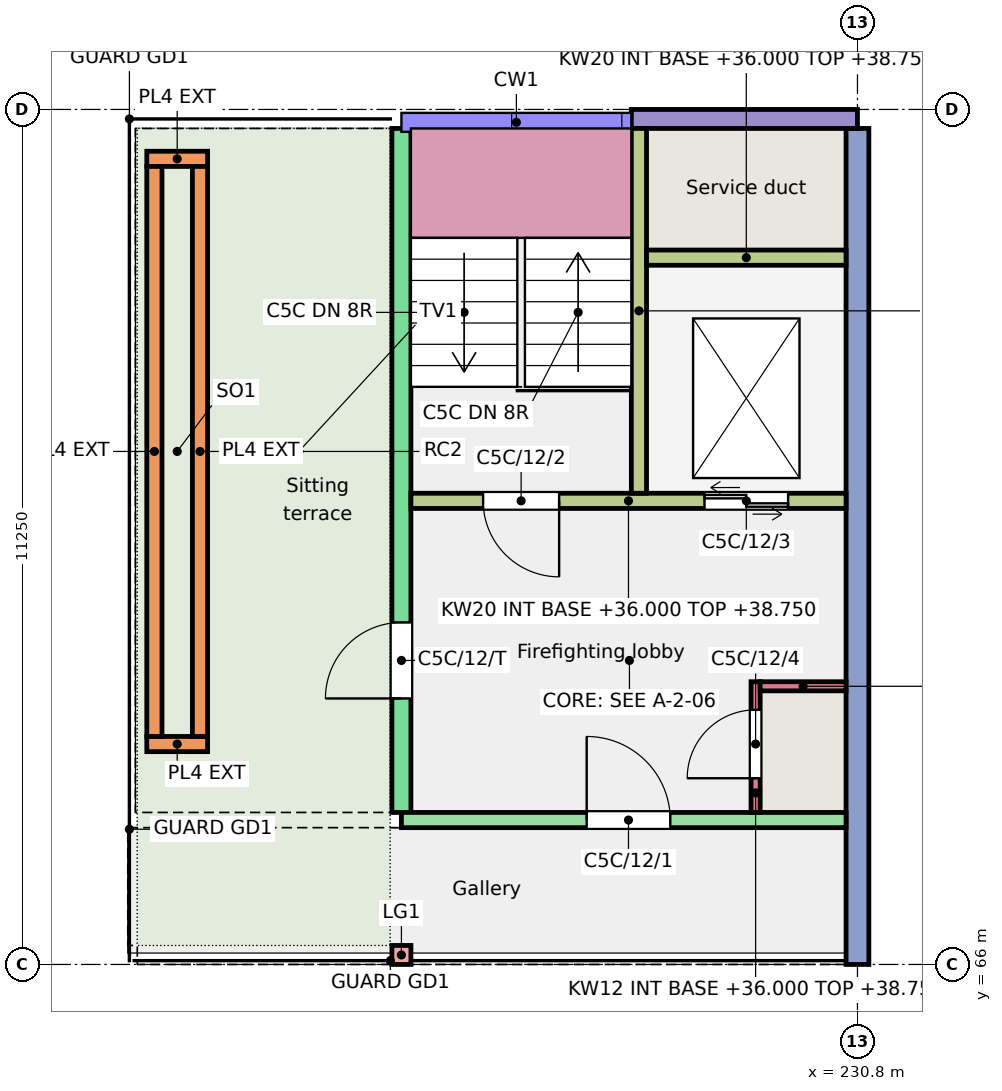
"""IFC4 building model, lengths in metres.
Left out: names, types, materials, properties, quantities, classifications, styles, units other than length and angle.
Written with IfcOpenShell. Run it as: python <this file> out.ifc"""

import sys

from ifc_helpers import new_model, si_unit, direction, frame, frame_2d, origin, origin_2d, place, context, subcontext, project, spatial, rectangle, extrude, element, fill, save


model = new_model("IFC4")
c1 = context("Model", 3, precision=1e-05, world=origin(), true_north=direction((0.0, 1.0)))
c2 = subcontext(c1, "Body", "Model", "MODEL_VIEW")
j1 = project(units=[si_unit("LENGTHUNIT", "METRE"), si_unit("PLANEANGLEUNIT", "RADIAN")], contexts=[c1])
p1 = place(None, origin())
s1 = spatial("IfcSite", under=j1, at=p1, CompositionType="ELEMENT")
p2 = place(p1, origin())
s2 = spatial("IfcBuilding", under=s1, at=p2, CompositionType="ELEMENT")
p3 = place(p2, frame((0.0, 0.0, 36.0)))
s3 = spatial("IfcBuildingStorey", under=s2, at=p3, CompositionType="ELEMENT", Elevation=36.0)
p4 = place(p3, frame((224.8, 68.0, 0.0), z_axis=(0.0, 0.0, 1.0), x_axis=(0.0, 1.0, 0.0)))
e1 = element("IfcWall", 1, at=p4, inside=s3, PredefinedType="SHEAR", context=c2, shape_type="SweptSolid", body=[
    extrude(rectangle(XDim=9.0, YDim=0.25, at=frame_2d((4.5, 0.0))), origin(), (0.0, 0.0, 1.0), 3.0),
])
p5 = place(p4, frame((1.5, 0.0, 0.0)))
e2 = element("IfcOpeningElement", 2, at=p5, cuts=e1, PredefinedType="OPENING", context=c2, shape_type="SweptSolid", body=[
    extrude(rectangle(XDim=1.0, YDim=2.1, at=frame_2d((0.5, 1.05))), frame((0.0, 0.135, 0.0), z_axis=(0.0, -1.0, 0.0), x_axis=(1.0, 0.0, 0.0)), (0.0, 0.0, 1.0), 0.27),
])
p6 = place(p3, frame((230.8, 66.0, 0.0), z_axis=(0.0, 0.0, 1.0), x_axis=(0.0, 1.0, 0.0)))
e3 = element("IfcWall", 3, at=p6, inside=s3, PredefinedType="SHEAR", context=c2, shape_type="SweptSolid", body=[
    extrude(rectangle(XDim=11.0, YDim=0.3, at=frame_2d((5.5, 0.0))), origin(), (0.0, 0.0, 1.0), 3.0),
])
p7 = place(p3, frame((227.825, 77.125, 0.0), z_axis=(0.0, 0.0, 1.0), x_axis=(1.0, 0.0, 0.0)))
e4 = element("IfcWall", 4, at=p7, inside=s3, PredefinedType="SOLIDWALL", context=c2, shape_type="SweptSolid", body=[
    extrude(rectangle(XDim=2.975, YDim=0.25, at=frame_2d((1.488, 0.0))), origin(), (0.0, 0.0, 1.0), 3.0),
])
p8 = place(p3, frame((224.8, 67.9, 0.0), z_axis=(0.0, 0.0, 1.0), x_axis=(1.0, 0.0, 0.0)))
e5 = element("IfcWall", 5, at=p8, inside=s3, PredefinedType="SHEAR", context=c2, shape_type="SweptSolid", body=[
    extrude(rectangle(XDim=5.85, YDim=0.2, at=frame_2d((2.925, 0.0))), origin(), (0.0, 0.0, 1.0), 2.75),
])
p9 = place(p8, frame((2.438, 0.0, 0.0)))
e6 = element("IfcOpeningElement", 6, at=p9, cuts=e5, PredefinedType="OPENING", context=c2, shape_type="SweptSolid", body=[
    extrude(rectangle(XDim=1.1, YDim=2.1, at=frame_2d((0.55, 1.05))), frame((0.0, 0.11, 0.0), z_axis=(0.0, -1.0, 0.0), x_axis=(1.0, 0.0, 0.0)), (0.0, 0.0, 1.0), 0.22),
])
p10 = place(p3, frame((224.925, 72.1, 0.0), z_axis=(0.0, 0.0, 1.0), x_axis=(1.0, 0.0, 0.0)))
e7 = element("IfcWall", 7, at=p10, inside=s3, PredefinedType="SHEAR", context=c2, shape_type="SweptSolid", body=[
    extrude(rectangle(XDim=5.725, YDim=0.2, at=frame_2d((2.862, 0.0))), origin(), (0.0, 0.0, 1.0), 2.75),
])
p11 = place(p10, frame((0.95, 0.0, 0.0)))
e8 = element("IfcOpeningElement", 8, at=p11, cuts=e7, PredefinedType="OPENING", context=c2, shape_type="SweptSolid", body=[
    extrude(rectangle(XDim=1.0, YDim=2.1, at=frame_2d((0.5, 1.05))), frame((0.0, 0.11, 0.0), z_axis=(0.0, -1.0, 0.0), x_axis=(1.0, 0.0, 0.0)), (0.0, 0.0, 1.0), 0.22),
])
p12 = place(p10, frame((3.863, 0.0, 0.0)))
e9 = element("IfcOpeningElement", 9, at=p12, cuts=e7, PredefinedType="OPENING", context=c2, shape_type="SweptSolid", body=[
    extrude(rectangle(XDim=1.1, YDim=2.1, at=frame_2d((0.55, 1.05))), frame((0.0, 0.11, 0.0), z_axis=(0.0, -1.0, 0.0), x_axis=(1.0, 0.0, 0.0)), (0.0, 0.0, 1.0), 0.22),
])
p13 = place(p3, frame((227.925, 72.2, 0.0), z_axis=(0.0, 0.0, 1.0), x_axis=(0.0, 1.0, 0.0)))
e10 = element("IfcWall", 10, at=p13, inside=s3, PredefinedType="SHEAR", context=c2, shape_type="SweptSolid", body=[
    extrude(rectangle(XDim=4.8, YDim=0.2, at=frame_2d((2.4, 0.0))), origin(), (0.0, 0.0, 1.0), 2.75),
])
p14 = place(p3, frame((228.025, 75.3, 0.0), z_axis=(0.0, 0.0, 1.0), x_axis=(1.0, 0.0, 0.0)))
e11 = element("IfcWall", 11, at=p14, inside=s3, PredefinedType="SHEAR", context=c2, shape_type="SweptSolid", body=[
    extrude(rectangle(XDim=2.625, YDim=0.2, at=frame_2d((1.312, 0.0))), origin(), (0.0, 0.0, 1.0), 2.75),
])
p15 = place(p3, frame((229.46, 68.0, 0.0), z_axis=(0.0, 0.0, 1.0), x_axis=(0.0, 1.0, 0.0)))
e12 = element("IfcWall", 12, at=p15, inside=s3, PredefinedType="SHEAR", context=c2, shape_type="SweptSolid", body=[
    extrude(rectangle(XDim=1.72, YDim=0.12, at=frame_2d((0.86, 0.0))), origin(), (0.0, 0.0, 1.0), 2.75),
])
p16 = place(p15, frame((0.45, 0.0, 0.0)))
e13 = element("IfcOpeningElement", 13, at=p16, cuts=e12, PredefinedType="OPENING", context=c2, shape_type="SweptSolid", body=[
    extrude(rectangle(XDim=0.9, YDim=2.1, at=frame_2d((0.45, 1.05))), frame((0.0, 0.07, 0.0), z_axis=(0.0, -1.0, 0.0), x_axis=(1.0, 0.0, 0.0)), (0.0, 0.0, 1.0), 0.14),
])
p17 = place(p3, frame((229.52, 69.66, 0.0), z_axis=(0.0, 0.0, 1.0), x_axis=(1.0, 0.0, 0.0)))
e14 = element("IfcWall", 14, at=p17, inside=s3, PredefinedType="SHEAR", context=c2, shape_type="SweptSolid", body=[
    extrude(rectangle(XDim=1.13, YDim=0.12, at=frame_2d((0.565, 0.0))), origin(), (0.0, 0.0, 1.0), 2.75),
])
p18 = place(p3, frame((224.8, 66.125, 0.0), z_axis=(0.0, 0.0, 1.0), x_axis=(1.0, 0.0, 0.0)))
e15 = element("IfcColumn", 15, at=p18, inside=s3, PredefinedType="COLUMN", context=c2, shape_type="SweptSolid", body=[
    extrude(rectangle(XDim=0.25, YDim=0.25, at=origin_2d()), origin(), (0.0, 0.0, 1.0), 3.0),
])
for number, where, z_axis, x_axis in (
    (16, (221.45, 68.9, 0.01), (0.0, 0.0, 1.0), (1.0, 0.0, 0.0)),
    (17, (221.45, 76.6, 0.01), (0.0, 0.0, 1.0), (1.0, 0.0, 0.0)),
):
    element("IfcWall", number, at=place(p3, frame(where, z_axis=z_axis, x_axis=x_axis)), inside=s3, PredefinedType="SOLIDWALL", context=c2, shape_type="SweptSolid", body=[
        extrude(rectangle(XDim=0.8, YDim=0.2, at=frame_2d((0.4, 0.0))), origin(), (0.0, 0.0, 1.0), 0.45),
    ])
for number, where, z_axis, x_axis in (
    (18, (221.55, 69.0, 0.01), (0.0, 0.0, 1.0), (0.0, 1.0, 0.0)),
    (19, (222.15, 69.0, 0.01), (0.0, 0.0, 1.0), (0.0, 1.0, 0.0)),
):
    element("IfcWall", number, at=place(p3, frame(where, z_axis=z_axis, x_axis=x_axis)), inside=s3, PredefinedType="SOLIDWALL", context=c2, shape_type="SweptSolid", body=[
        extrude(rectangle(XDim=7.5, YDim=0.2, at=frame_2d((3.75, 0.0))), origin(), (0.0, 0.0, 1.0), 0.45),
    ])
p19 = place(p9, origin())
e20 = element("IfcDoor", 20, at=p19, inside=s3, OperationType="SINGLE_SWING_LEFT", PredefinedType="DOOR", context=c2, shape_type="SweptSolid", body=[
    extrude(rectangle(XDim=1.1, YDim=2.1, at=frame_2d((0.55, 1.05))), frame((0.0, 0.025, 0.0), z_axis=(0.0, -1.0, 0.0), x_axis=(1.0, 0.0, 0.0)), (0.0, 0.0, 1.0), 0.05),
])
fill(e6, e20)
p20 = place(p11, origin())
e21 = element("IfcDoor", 21, at=p20, inside=s3, OperationType="SINGLE_SWING_RIGHT", PredefinedType="DOOR", context=c2, shape_type="SweptSolid", body=[
    extrude(rectangle(XDim=1.0, YDim=2.1, at=frame_2d((0.5, 1.05))), frame((0.0, 0.025, 0.0), z_axis=(0.0, -1.0, 0.0), x_axis=(1.0, 0.0, 0.0)), (0.0, 0.0, 1.0), 0.05),
])
fill(e8, e21)
p21 = place(p12, origin())
e22 = element("IfcDoor", 22, at=p21, inside=s3, OperationType="DOUBLE_DOOR_SLIDING", PredefinedType="DOOR", context=c2, shape_type="SweptSolid", body=[
    extrude(rectangle(XDim=1.1, YDim=2.1, at=frame_2d((0.55, 1.05))), frame((0.0, 0.025, 0.0), z_axis=(0.0, -1.0, 0.0), x_axis=(1.0, 0.0, 0.0)), (0.0, 0.0, 1.0), 0.05),
])
fill(e9, e22)
p22 = place(p16, origin())
e23 = element("IfcDoor", 23, at=p22, inside=s3, OperationType="SINGLE_SWING_LEFT", PredefinedType="DOOR", context=c2, shape_type="SweptSolid", body=[
    extrude(rectangle(XDim=0.9, YDim=2.1, at=frame_2d((0.45, 1.05))), frame((0.0, 0.025, 0.0), z_axis=(0.0, -1.0, 0.0), x_axis=(1.0, 0.0, 0.0)), (0.0, 0.0, 1.0), 0.05),
])
fill(e13, e23)
p23 = place(p5, origin())
e24 = element("IfcDoor", 24, at=p23, inside=s3, OperationType="SINGLE_SWING_LEFT", PredefinedType="DOOR", context=c2, shape_type="SweptSolid", body=[
    extrude(rectangle(XDim=1.0, YDim=2.1, at=frame_2d((0.5, 1.05))), frame((0.0, 0.025, 0.0), z_axis=(0.0, -1.0, 0.0), x_axis=(1.0, 0.0, 0.0)), (0.0, 0.0, 1.0), 0.05),
])
fill(e2, e24)
save(model, sys.argv[1])
